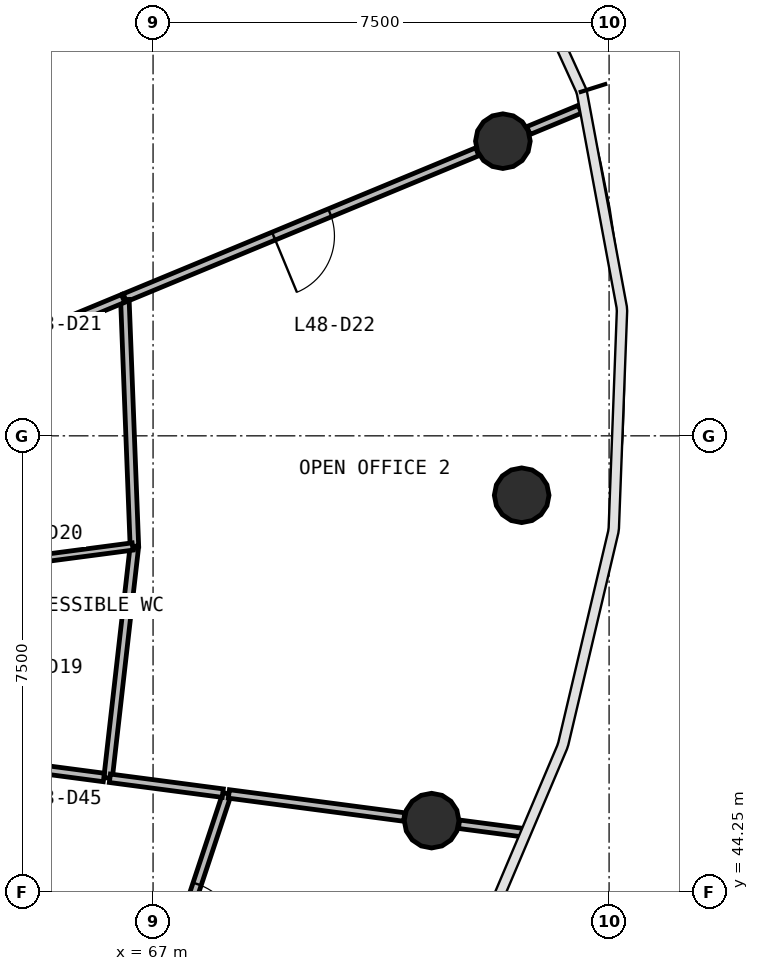
"""IFC4 building model, lengths in metres.
Left out: names, types, materials, properties, quantities, classifications, styles, units other than length and angle.
Written with IfcOpenShell. Run it as: python <this file> out.ifc"""

import sys

from ifc_helpers import new_model, si_unit, direction, frame, frame_2d, origin, origin_2d, place, context, subcontext, project, spatial, rectangle, circle, extrude, source, transform, mapped, element, fill, save


model = new_model("IFC4")
c1 = context("Model", 3, precision=1e-05, world=origin(), true_north=direction((0.0, 1.0)))
c2 = subcontext(c1, "Body", "Model", "MODEL_VIEW")
j1 = project(units=[si_unit("LENGTHUNIT", "METRE"), si_unit("PLANEANGLEUNIT", "RADIAN")], contexts=[c1])
p1 = place(None, origin())
s1 = spatial("IfcSite", under=j1, at=p1, CompositionType="ELEMENT")
p2 = place(p1, origin())
s2 = spatial("IfcBuilding", under=s1, at=p2, CompositionType="ELEMENT")
p3 = place(p2, frame((0.0, 0.0, 199.4)))
s3 = spatial("IfcBuildingStorey", under=s2, at=p3, CompositionType="ELEMENT", Elevation=199.4)
m1 = source(origin(), c2, "Body", "SweptSolid", [
    extrude(circle(Radius=0.45, at=origin_2d()), origin(), (0.0, 0.0, 1.0), 3.9),
])
for number, where, z_axis, x_axis in (
    (1, (73.062, 50.773, 0.0), (0.0, 0.0, 1.0), (1.0, 0.0, 0.0)),
    (2, (72.753, 56.596, 0.0), (0.0, 0.0, 1.0), (1.0, 0.0, 0.0)),
    (3, (71.581, 45.422, 0.0), (0.0, 0.0, 1.0), (1.0, 0.0, 0.0)),
):
    element("IfcColumn", number, at=place(p3, frame(where, z_axis=z_axis, x_axis=x_axis)), inside=s3, PredefinedType="COLUMN", context=c2, shape_type="MappedRepresentation", body=[
        mapped(m1, transform((0.0, 0.0, 0.0), scale=1.0)),
    ])
p4 = place(p3, frame((72.333, 56.422, 0.0), z_axis=(0.0, 0.0, 1.0), x_axis=(-0.92388406428, -0.382672491525, 0.0)))
e4 = element("IfcWall", 4, at=p4, inside=s3, PredefinedType="PARTITIONING", context=c2, shape_type="SweptSolid", body=[
    extrude(rectangle(XDim=6.275, YDim=0.14, at=frame_2d((3.138, 0.0))), origin(), (0.0, 0.0, 1.0), 2.88),
])
p5 = place(p4, frame((2.625, 0.0, 0.0)))
e5 = element("IfcOpeningElement", 5, at=p5, cuts=e4, PredefinedType="OPENING", context=c2, shape_type="SweptSolid", body=[
    extrude(rectangle(XDim=1.0, YDim=2.1, at=frame_2d((0.5, 1.05))), frame((0.0, 0.08, 0.0), z_axis=(0.0, -1.0, 0.0), x_axis=(1.0, 0.0, 0.0)), (0.0, 0.0, 1.0), 0.16),
])
p6 = place(p3, frame((63.49, 56.817, 0.0), z_axis=(0.0, 0.0, 1.0), x_axis=(0.793351007213, 0.608764469523, 0.0)))
e6 = element("IfcWall", 6, at=p6, inside=s3, PredefinedType="PARTITIONING", context=c2, shape_type="SweptSolid", body=[
    extrude(rectangle(XDim=4.802, YDim=0.14, at=frame_2d((2.401, 0.0))), origin(), (0.0, 0.0, 1.0), 2.88),
])
p7 = place(p3, frame((68.217, 45.865, 0.0), z_axis=(0.0, 0.0, 1.0), x_axis=(-0.314593796034, -0.94922639212, 0.0)))
e7 = element("IfcWall", 7, at=p7, inside=s3, PredefinedType="PARTITIONING", context=c2, shape_type="SweptSolid", body=[
    extrude(rectangle(XDim=4.215, YDim=0.14, at=frame_2d((2.107, 0.0))), origin(), (0.0, 0.0, 1.0), 2.88),
])
p8 = place(p7, frame((1.565, 0.0, 0.0)))
e8 = element("IfcOpeningElement", 8, at=p8, cuts=e7, PredefinedType="OPENING", context=c2, shape_type="SweptSolid", body=[
    extrude(rectangle(XDim=1.0, YDim=2.1, at=frame_2d((0.5, 1.05))), frame((0.0, 0.08, 0.0), z_axis=(0.0, -1.0, 0.0), x_axis=(1.0, 0.0, 0.0)), (0.0, 0.0, 1.0), 0.16),
])
p9 = place(p3, frame((66.693, 49.934, 0.0), z_axis=(0.0, 0.0, 1.0), x_axis=(-0.038671022185, 0.999251996267, 0.0)))
e9 = element("IfcWall", 9, at=p9, inside=s3, PredefinedType="PARTITIONING", context=c2, shape_type="SweptSolid", body=[
    extrude(rectangle(XDim=4.059, YDim=0.14, at=frame_2d((2.03, 0.0))), origin(), (0.0, 0.0, 1.0), 2.88),
])
p10 = place(p3, frame((66.26, 46.123, 0.0), z_axis=(0.0, 0.0, 1.0), x_axis=(0.112951423427, 0.993600511245, 0.0)))
e10 = element("IfcWall", 10, at=p10, inside=s3, PredefinedType="PARTITIONING", context=c2, shape_type="SweptSolid", body=[
    extrude(rectangle(XDim=3.806, YDim=0.14, at=frame_2d((1.903, 0.0))), origin(), (0.0, 0.0, 1.0), 2.88),
])
p11 = place(p3, frame((63.49, 52.759, 0.0), z_axis=(0.0, 0.0, 1.0), x_axis=(0.923871065891, 0.382703871955, 0.0)))
e11 = element("IfcWall", 11, at=p11, inside=s3, PredefinedType="PARTITIONING", context=c2, shape_type="SweptSolid", body=[
    extrude(rectangle(XDim=3.266, YDim=0.14, at=frame_2d((1.633, 0.0))), origin(), (0.0, 0.0, 1.0), 2.88),
])
p12 = place(p3, frame((68.247, 45.861, 0.0), z_axis=(0.0, 0.0, 1.0), x_axis=(0.991445722729, -0.130519649411, 0.0)))
e12 = element("IfcWall", 12, at=p12, inside=s3, PredefinedType="PARTITIONING", context=c2, shape_type="SweptSolid", body=[
    extrude(rectangle(XDim=2.909, YDim=0.14, at=frame_2d((1.454, 0.0))), origin(), (0.0, 0.0, 1.0), 2.88),
])
p13 = place(p3, frame((63.49, 46.487, 0.0), z_axis=(0.0, 0.0, 1.0), x_axis=(0.99144880359, -0.130496244624, 0.0)))
e13 = element("IfcWall", 13, at=p13, inside=s3, PredefinedType="PARTITIONING", context=c2, shape_type="SweptSolid", body=[
    extrude(rectangle(XDim=2.724, YDim=0.14, at=frame_2d((1.362, 0.0))), origin(), (0.0, 0.0, 1.0), 2.88),
])
p14 = place(p3, frame((66.29, 46.119, 0.0), z_axis=(0.0, 0.0, 1.0), x_axis=(0.991446305504, -0.130515222489, 0.0)))
e14 = element("IfcWall", 14, at=p14, inside=s3, PredefinedType="PARTITIONING", context=c2, shape_type="SweptSolid", body=[
    extrude(rectangle(XDim=1.873, YDim=0.14, at=frame_2d((0.936, 0.0))), origin(), (0.0, 0.0, 1.0), 2.88),
])
p15 = place(p3, frame((72.031, 45.363, 0.0), z_axis=(0.0, 0.0, 1.0), x_axis=(0.991454295543, -0.130454512571, 0.0)))
e15 = element("IfcWall", 15, at=p15, inside=s3, PredefinedType="PARTITIONING", context=c2, shape_type="SweptSolid", body=[
    extrude(rectangle(XDim=1.067, YDim=0.14, at=frame_2d((0.533, 0.0))), origin(), (0.0, 0.0, 1.0), 2.88),
])
p16 = place(p3, frame((73.174, 56.77, 0.0), z_axis=(0.0, 0.0, 1.0), x_axis=(0.923854619105, 0.382743573112, 0.0)))
e16 = element("IfcWall", 16, at=p16, inside=s3, PredefinedType="PARTITIONING", context=c2, shape_type="SweptSolid", body=[
    extrude(rectangle(XDim=0.917, YDim=0.14, at=frame_2d((0.458, 0.0))), origin(), (0.0, 0.0, 1.0), 2.88),
])
p17 = place(p3, frame((63.49, 49.513, 0.0), z_axis=(0.0, 0.0, 1.0), x_axis=(0.991448323654, 0.130499890897, 0.0)))
e17 = element("IfcWall", 17, at=p17, inside=s3, PredefinedType="PARTITIONING", context=c2, shape_type="SweptSolid", body=[
    extrude(rectangle(XDim=3.201, YDim=0.12, at=frame_2d((1.601, 0.0))), origin(), (0.0, 0.0, 1.0), 2.88),
])
m2 = source(origin(), c2, "Body", "SweptSolid", [
    extrude(rectangle(XDim=1.0, YDim=2.1, at=frame_2d((0.5, 1.05))), frame((0.0, 0.025, 0.0), z_axis=(0.0, -1.0, 0.0), x_axis=(1.0, 0.0, 0.0)), (0.0, 0.0, 1.0), 0.05),
])
p18 = place(p5, origin())
e18 = element("IfcDoor", 18, at=p18, inside=s3, OperationType="SINGLE_SWING_RIGHT", PredefinedType="DOOR", context=c2, shape_type="MappedRepresentation", body=[
    mapped(m2, transform((0.0, 0.0, 0.0), scale=1.0)),
])
fill(e5, e18)
p19 = place(p8, origin())
e19 = element("IfcDoor", 19, at=p19, inside=s3, OperationType="SINGLE_SWING_RIGHT", PredefinedType="DOOR", context=c2, shape_type="MappedRepresentation", body=[
    mapped(m2, transform((0.0, 0.0, 0.0), scale=1.0)),
])
fill(e8, e19)
save(model, sys.argv[1])
